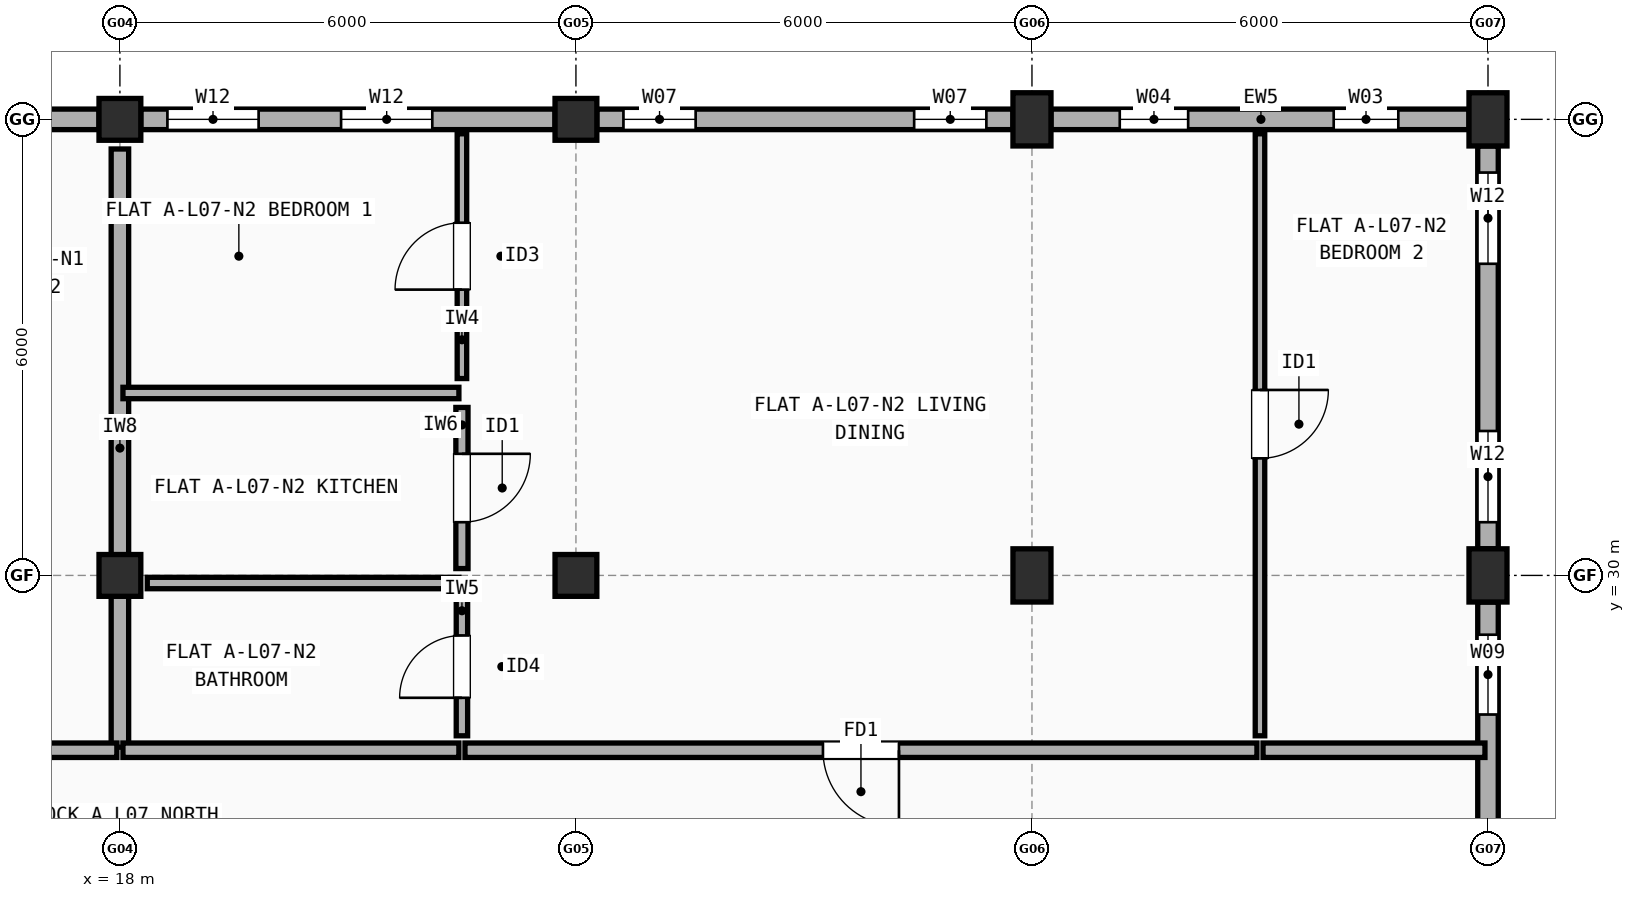
"""IFC4 building model, lengths in metres.
Left out: names, types, materials, properties, quantities, classifications, styles, units other than length and angle.
Written with IfcOpenShell. Run it as: python <this file> out.ifc"""

import sys

from ifc_helpers import new_model, si_unit, direction, frame, frame_2d, origin, origin_2d, place, context, subcontext, project, spatial, rectangle, extrude, element, fill, save


model = new_model("IFC4")
c1 = context("Model", 3, precision=1e-05, world=origin(), true_north=direction((0.0, 1.0)))
c2 = subcontext(c1, "Body", "Model", "MODEL_VIEW")
j1 = project(units=[si_unit("LENGTHUNIT", "METRE"), si_unit("PLANEANGLEUNIT", "RADIAN")], contexts=[c1])
p1 = place(None, origin())
s1 = spatial("IfcSite", under=j1, at=p1, CompositionType="ELEMENT")
p2 = place(p1, origin())
s2 = spatial("IfcBuilding", under=s1, at=p2, CompositionType="ELEMENT")
p3 = place(p2, frame((0.0, 0.0, 23.7)))
s3 = spatial("IfcBuildingStorey", under=s2, at=p3, CompositionType="ELEMENT", Elevation=23.7)
for number, where, z_axis, x_axis in (
    (1, (18.0, 30.0, 0.0), (0.0, 0.0, 1.0), (1.0, 0.0, 0.0)),
    (2, (18.0, 36.0, 0.0), (0.0, 0.0, 1.0), (1.0, 0.0, 0.0)),
    (3, (24.0, 30.0, 0.0), (0.0, 0.0, 1.0), (1.0, 0.0, 0.0)),
    (4, (24.0, 36.0, 0.0), (0.0, 0.0, 1.0), (1.0, 0.0, 0.0)),
):
    element("IfcColumn", number, at=place(p3, frame(where, z_axis=z_axis, x_axis=x_axis)), inside=s3, PredefinedType="COLUMN", context=c2, shape_type="SweptSolid", body=[
        extrude(rectangle(XDim=0.55, YDim=0.55, at=origin_2d()), origin(), (0.0, 0.0, 1.0), 2.975),
    ])
for number, where, z_axis, x_axis in (
    (5, (30.0, 30.0, 0.0), (0.0, 0.0, 1.0), (1.0, 0.0, 0.0)),
    (6, (30.0, 36.0, 0.0), (0.0, 0.0, 1.0), (1.0, 0.0, 0.0)),
    (7, (36.0, 30.0, 0.0), (0.0, 0.0, 1.0), (1.0, 0.0, 0.0)),
    (8, (36.0, 36.0, 0.0), (0.0, 0.0, 1.0), (1.0, 0.0, 0.0)),
):
    element("IfcColumn", number, at=place(p3, frame(where, z_axis=z_axis, x_axis=x_axis)), inside=s3, PredefinedType="COLUMN", context=c2, shape_type="SweptSolid", body=[
        extrude(rectangle(XDim=0.5, YDim=0.7, at=origin_2d()), origin(), (0.0, 0.0, 1.0), 2.975),
    ])
p4 = place(p3, frame((36.0, 24.35, 0.0), z_axis=(0.0, 0.0, 1.0), x_axis=(0.0, 1.0, 0.0)))
e9 = element("IfcWall", 9, at=p4, inside=s3, PredefinedType="STANDARD", context=c2, shape_type="SweptSolid", body=[
    extrude(rectangle(XDim=5.3, YDim=0.27, at=frame_2d((2.65, 0.0))), origin(), (0.0, 0.0, 1.0), 2.457),
])
p5 = place(p4, frame((1.18, 0.0, 0.9)))
e10 = element("IfcOpeningElement", 10, at=p5, cuts=e9, PredefinedType="OPENING", context=c2, shape_type="SweptSolid", body=[
    extrude(rectangle(XDim=0.95, YDim=1.35, at=frame_2d((0.475, 0.675))), frame((0.0, 0.145, 0.0), z_axis=(0.0, -1.0, 0.0), x_axis=(1.0, 0.0, 0.0)), (0.0, 0.0, 1.0), 0.29),
])
p6 = place(p4, frame((3.82, 0.0, 0.9)))
e11 = element("IfcOpeningElement", 11, at=p6, cuts=e9, PredefinedType="OPENING", context=c2, shape_type="SweptSolid", body=[
    extrude(rectangle(XDim=1.05, YDim=1.35, at=frame_2d((0.525, 0.675))), frame((0.0, 0.145, 0.0), z_axis=(0.0, -1.0, 0.0), x_axis=(1.0, 0.0, 0.0)), (0.0, 0.0, 1.0), 0.29),
])
p7 = place(p3, frame((36.0, 30.35, 0.0), z_axis=(0.0, 0.0, 1.0), x_axis=(0.0, 1.0, 0.0)))
e12 = element("IfcWall", 12, at=p7, inside=s3, PredefinedType="STANDARD", context=c2, shape_type="SweptSolid", body=[
    extrude(rectangle(XDim=5.3, YDim=0.27, at=frame_2d((2.65, 0.0))), origin(), (0.0, 0.0, 1.0), 2.457),
])
p8 = place(p7, frame((0.35, 0.0, 0.9)))
e13 = element("IfcOpeningElement", 13, at=p8, cuts=e12, PredefinedType="OPENING", context=c2, shape_type="SweptSolid", body=[
    extrude(rectangle(XDim=1.2, YDim=1.35, at=frame_2d((0.6, 0.675))), frame((0.0, 0.145, 0.0), z_axis=(0.0, -1.0, 0.0), x_axis=(1.0, 0.0, 0.0)), (0.0, 0.0, 1.0), 0.29),
])
p9 = place(p7, frame((3.75, 0.0, 0.9)))
e14 = element("IfcOpeningElement", 14, at=p9, cuts=e12, PredefinedType="OPENING", context=c2, shape_type="SweptSolid", body=[
    extrude(rectangle(XDim=1.2, YDim=1.35, at=frame_2d((0.6, 0.675))), frame((0.0, 0.145, 0.0), z_axis=(0.0, -1.0, 0.0), x_axis=(1.0, 0.0, 0.0)), (0.0, 0.0, 1.0), 0.29),
])
p10 = place(p3, frame((35.75, 36.0, 0.0), z_axis=(0.0, 0.0, 1.0), x_axis=(-1.0, 0.0, 0.0)))
e15 = element("IfcWall", 15, at=p10, inside=s3, PredefinedType="STANDARD", context=c2, shape_type="SweptSolid", body=[
    extrude(rectangle(XDim=5.5, YDim=0.27, at=frame_2d((2.75, 0.0))), origin(), (0.0, 0.0, 1.0), 2.457),
])
p11 = place(p10, frame((0.93, 0.0, 0.9)))
e16 = element("IfcOpeningElement", 16, at=p11, cuts=e15, PredefinedType="OPENING", context=c2, shape_type="SweptSolid", body=[
    extrude(rectangle(XDim=0.85, YDim=1.25, at=frame_2d((0.425, 0.625))), frame((0.0, 0.145, 0.0), z_axis=(0.0, -1.0, 0.0), x_axis=(1.0, 0.0, 0.0)), (0.0, 0.0, 1.0), 0.29),
])
p12 = place(p10, frame((3.695, 0.0, 0.9)))
e17 = element("IfcOpeningElement", 17, at=p12, cuts=e15, PredefinedType="OPENING", context=c2, shape_type="SweptSolid", body=[
    extrude(rectangle(XDim=0.9, YDim=1.3, at=frame_2d((0.45, 0.65))), frame((0.0, 0.145, 0.0), z_axis=(0.0, -1.0, 0.0), x_axis=(1.0, 0.0, 0.0)), (0.0, 0.0, 1.0), 0.29),
])
p13 = place(p3, frame((29.75, 36.0, 0.0), z_axis=(0.0, 0.0, 1.0), x_axis=(-1.0, 0.0, 0.0)))
e18 = element("IfcWall", 18, at=p13, inside=s3, PredefinedType="STANDARD", context=c2, shape_type="SweptSolid", body=[
    extrude(rectangle(XDim=5.475, YDim=0.27, at=frame_2d((2.738, 0.0))), origin(), (0.0, 0.0, 1.0), 2.457),
])
p14 = place(p13, frame((0.35, 0.0, 0.9)))
e19 = element("IfcOpeningElement", 19, at=p14, cuts=e18, PredefinedType="OPENING", context=c2, shape_type="SweptSolid", body=[
    extrude(rectangle(XDim=0.95, YDim=1.35, at=frame_2d((0.475, 0.675))), frame((0.0, 0.145, 0.0), z_axis=(0.0, -1.0, 0.0), x_axis=(1.0, 0.0, 0.0)), (0.0, 0.0, 1.0), 0.29),
])
p15 = place(p13, frame((4.175, 0.0, 0.9)))
e20 = element("IfcOpeningElement", 20, at=p15, cuts=e18, PredefinedType="OPENING", context=c2, shape_type="SweptSolid", body=[
    extrude(rectangle(XDim=0.95, YDim=1.35, at=frame_2d((0.475, 0.675))), frame((0.0, 0.145, 0.0), z_axis=(0.0, -1.0, 0.0), x_axis=(1.0, 0.0, 0.0)), (0.0, 0.0, 1.0), 0.29),
])
p16 = place(p3, frame((23.725, 36.0, 0.0), z_axis=(0.0, 0.0, 1.0), x_axis=(-1.0, 0.0, 0.0)))
e21 = element("IfcWall", 21, at=p16, inside=s3, PredefinedType="STANDARD", context=c2, shape_type="SweptSolid", body=[
    extrude(rectangle(XDim=5.45, YDim=0.27, at=frame_2d((2.725, 0.0))), origin(), (0.0, 0.0, 1.0), 2.457),
])
p17 = place(p16, frame((1.615, 0.0, 0.9)))
e22 = element("IfcOpeningElement", 22, at=p17, cuts=e21, PredefinedType="OPENING", context=c2, shape_type="SweptSolid", body=[
    extrude(rectangle(XDim=1.2, YDim=1.35, at=frame_2d((0.6, 0.675))), frame((0.0, 0.145, 0.0), z_axis=(0.0, -1.0, 0.0), x_axis=(1.0, 0.0, 0.0)), (0.0, 0.0, 1.0), 0.29),
])
p18 = place(p16, frame((3.9, 0.0, 0.9)))
e23 = element("IfcOpeningElement", 23, at=p18, cuts=e21, PredefinedType="OPENING", context=c2, shape_type="SweptSolid", body=[
    extrude(rectangle(XDim=1.2, YDim=1.35, at=frame_2d((0.6, 0.675))), frame((0.0, 0.145, 0.0), z_axis=(0.0, -1.0, 0.0), x_axis=(1.0, 0.0, 0.0)), (0.0, 0.0, 1.0), 0.29),
])
p19 = place(p3, frame((17.725, 36.0, 0.0), z_axis=(0.0, 0.0, 1.0), x_axis=(-1.0, 0.0, 0.0)))
e24 = element("IfcWall", 24, at=p19, inside=s3, PredefinedType="STANDARD", context=c2, shape_type="SweptSolid", body=[
    extrude(rectangle(XDim=5.45, YDim=0.27, at=frame_2d((2.725, 0.0))), origin(), (0.0, 0.0, 1.0), 2.457),
])
p20 = place(p19, frame((0.917, 0.0, 0.9)))
e25 = element("IfcOpeningElement", 25, at=p20, cuts=e24, PredefinedType="OPENING", context=c2, shape_type="SweptSolid", body=[
    extrude(rectangle(XDim=0.85, YDim=1.25, at=frame_2d((0.425, 0.625))), frame((0.0, 0.145, 0.0), z_axis=(0.0, -1.0, 0.0), x_axis=(1.0, 0.0, 0.0)), (0.0, 0.0, 1.0), 0.29),
])
p21 = place(p19, frame((3.657, 0.0, 0.9)))
e26 = element("IfcOpeningElement", 26, at=p21, cuts=e24, PredefinedType="OPENING", context=c2, shape_type="SweptSolid", body=[
    extrude(rectangle(XDim=0.9, YDim=1.3, at=frame_2d((0.45, 0.65))), frame((0.0, 0.145, 0.0), z_axis=(0.0, -1.0, 0.0), x_axis=(1.0, 0.0, 0.0)), (0.0, 0.0, 1.0), 0.29),
])
p22 = place(p3, frame((18.0, 27.74, 0.0), z_axis=(0.0, 0.0, 1.0), x_axis=(0.0, 1.0, 0.0)))
e27 = element("IfcWall", 27, at=p22, inside=s3, PredefinedType="SOLIDWALL", context=c2, shape_type="SweptSolid", body=[
    extrude(rectangle(XDim=7.87, YDim=0.23, at=frame_2d((3.935, 0.0))), origin(), (0.0, 0.0, 1.0), 2.508),
])
p23 = place(p3, frame((15.04, 27.7, 0.0), z_axis=(0.0, 0.0, 1.0), x_axis=(1.0, 0.0, 0.0)))
e28 = element("IfcWall", 28, at=p23, inside=s3, PredefinedType="SOLIDWALL", context=c2, shape_type="SweptSolid", body=[
    extrude(rectangle(XDim=2.92, YDim=0.19, at=frame_2d((1.46, 0.0))), origin(), (0.0, 0.0, 1.0), 2.975),
])
p24 = place(p3, frame((18.04, 27.7, 0.0), z_axis=(0.0, 0.0, 1.0), x_axis=(1.0, 0.0, 0.0)))
e29 = element("IfcWall", 29, at=p24, inside=s3, PredefinedType="SOLIDWALL", context=c2, shape_type="SweptSolid", body=[
    extrude(rectangle(XDim=4.42, YDim=0.19, at=frame_2d((2.21, 0.0))), origin(), (0.0, 0.0, 1.0), 2.975),
])
p25 = place(p3, frame((22.54, 27.7, 0.0), z_axis=(0.0, 0.0, 1.0), x_axis=(1.0, 0.0, 0.0)))
e30 = element("IfcWall", 30, at=p25, inside=s3, PredefinedType="SOLIDWALL", context=c2, shape_type="SweptSolid", body=[
    extrude(rectangle(XDim=10.42, YDim=0.19, at=frame_2d((5.21, 0.0))), origin(), (0.0, 0.0, 1.0), 2.457),
])
p26 = place(p25, frame((4.71, 0.0, 0.0)))
e31 = element("IfcOpeningElement", 31, at=p26, cuts=e30, PredefinedType="OPENING", context=c2, shape_type="SweptSolid", body=[
    extrude(rectangle(XDim=1.0, YDim=2.15, at=frame_2d((0.5, 1.075))), frame((0.0, 0.105, 0.0), z_axis=(0.0, -1.0, 0.0), x_axis=(1.0, 0.0, 0.0)), (0.0, 0.0, 1.0), 0.21),
])
p27 = place(p3, frame((22.5, 32.59, 0.0), z_axis=(0.0, 0.0, 1.0), x_axis=(0.0, 1.0, 0.0)))
e32 = element("IfcWall", 32, at=p27, inside=s3, PredefinedType="PARTITIONING", context=c2, shape_type="SweptSolid", body=[
    extrude(rectangle(XDim=3.22, YDim=0.125, at=frame_2d((1.61, 0.0))), origin(), (0.0, 0.0, 1.0), 2.975),
])
p28 = place(p27, frame((1.17, 0.0, 0.0)))
e33 = element("IfcOpeningElement", 33, at=p28, cuts=e32, PredefinedType="OPENING", context=c2, shape_type="SweptSolid", body=[
    extrude(rectangle(XDim=0.88, YDim=2.1, at=frame_2d((0.44, 1.05))), frame((0.0, 0.073, 0.0), z_axis=(0.0, -1.0, 0.0), x_axis=(1.0, 0.0, 0.0)), (0.0, 0.0, 1.0), 0.145),
])
p29 = place(p3, frame((22.5, 30.09, 0.0), z_axis=(0.0, 0.0, 1.0), x_axis=(0.0, 1.0, 0.0)))
e34 = element("IfcWall", 34, at=p29, inside=s3, PredefinedType="PLUMBINGWALL", context=c2, shape_type="SweptSolid", body=[
    extrude(rectangle(XDim=2.12, YDim=0.16, at=frame_2d((1.06, 0.0))), origin(), (0.0, 0.0, 1.0), 2.457),
])
p30 = place(p29, frame((0.61, 0.0, 0.0)))
e35 = element("IfcOpeningElement", 35, at=p30, cuts=e34, PredefinedType="OPENING", context=c2, shape_type="SweptSolid", body=[
    extrude(rectangle(XDim=0.9, YDim=2.1, at=frame_2d((0.45, 1.05))), frame((0.0, 0.09, 0.0), z_axis=(0.0, -1.0, 0.0), x_axis=(1.0, 0.0, 0.0)), (0.0, 0.0, 1.0), 0.18),
])
p31 = place(p3, frame((22.5, 27.89, 0.0), z_axis=(0.0, 0.0, 1.0), x_axis=(0.0, 1.0, 0.0)))
e36 = element("IfcWall", 36, at=p31, inside=s3, PredefinedType="PARTITIONING", context=c2, shape_type="SweptSolid", body=[
    extrude(rectangle(XDim=1.82, YDim=0.15, at=frame_2d((0.91, 0.0))), origin(), (0.0, 0.0, 1.0), 2.975),
])
p32 = place(p31, frame((0.5, 0.0, 0.0)))
e37 = element("IfcOpeningElement", 37, at=p32, cuts=e36, PredefinedType="OPENING", context=c2, shape_type="SweptSolid", body=[
    extrude(rectangle(XDim=0.82, YDim=2.08, at=frame_2d((0.41, 1.04))), frame((0.0, 0.085, 0.0), z_axis=(0.0, -1.0, 0.0), x_axis=(1.0, 0.0, 0.0)), (0.0, 0.0, 1.0), 0.17),
])
p33 = place(p3, frame((18.04, 32.4, 0.0), z_axis=(0.0, 0.0, 1.0), x_axis=(1.0, 0.0, 0.0)))
e38 = element("IfcWall", 38, at=p33, inside=s3, PredefinedType="PARTITIONING", context=c2, shape_type="SweptSolid", body=[
    extrude(rectangle(XDim=4.42, YDim=0.15, at=frame_2d((2.21, 0.0))), origin(), (0.0, 0.0, 1.0), 2.508),
])
p34 = place(p3, frame((18.36, 29.9, 0.0), z_axis=(0.0, 0.0, 1.0), x_axis=(1.0, 0.0, 0.0)))
e39 = element("IfcWall", 39, at=p34, inside=s3, PredefinedType="PARTITIONING", context=c2, shape_type="SweptSolid", body=[
    extrude(rectangle(XDim=4.1, YDim=0.15, at=frame_2d((2.05, 0.0))), origin(), (0.0, 0.0, 1.0), 2.457),
])
p35 = place(p3, frame((33.04, 27.7, 0.0), z_axis=(0.0, 0.0, 1.0), x_axis=(1.0, 0.0, 0.0)))
e40 = element("IfcWall", 40, at=p35, inside=s3, PredefinedType="SOLIDWALL", context=c2, shape_type="SweptSolid", body=[
    extrude(rectangle(XDim=2.92, YDim=0.19, at=frame_2d((1.46, 0.0))), origin(), (0.0, 0.0, 1.0), 2.457),
])
p36 = place(p3, frame((33.0, 27.89, 0.0), z_axis=(0.0, 0.0, 1.0), x_axis=(0.0, 1.0, 0.0)))
e41 = element("IfcWall", 41, at=p36, inside=s3, PredefinedType="PARTITIONING", context=c2, shape_type="SweptSolid", body=[
    extrude(rectangle(XDim=7.92, YDim=0.125, at=frame_2d((3.96, 0.0))), origin(), (0.0, 0.0, 1.0), 2.457),
])
p37 = place(p36, frame((3.65, 0.0, 0.0)))
e42 = element("IfcOpeningElement", 42, at=p37, cuts=e41, PredefinedType="OPENING", context=c2, shape_type="SweptSolid", body=[
    extrude(rectangle(XDim=0.9, YDim=2.1, at=frame_2d((0.45, 1.05))), frame((0.0, 0.073, 0.0), z_axis=(0.0, -1.0, 0.0), x_axis=(1.0, 0.0, 0.0)), (0.0, 0.0, 1.0), 0.145),
])
p38 = place(p6, origin())
e43 = element("IfcWindow", 43, at=p38, inside=s3, PartitioningType="SINGLE_PANEL", PredefinedType="WINDOW", context=c2, shape_type="SweptSolid", body=[
    extrude(rectangle(XDim=1.05, YDim=1.35, at=frame_2d((0.525, 0.675))), frame((0.0, 0.03, 0.0), z_axis=(0.0, -1.0, 0.0), x_axis=(1.0, 0.0, 0.0)), (0.0, 0.0, 1.0), 0.06),
])
fill(e11, e43)
p39 = place(p8, origin())
e44 = element("IfcWindow", 44, at=p39, inside=s3, PartitioningType="SINGLE_PANEL", PredefinedType="WINDOW", context=c2, shape_type="SweptSolid", body=[
    extrude(rectangle(XDim=1.2, YDim=1.35, at=frame_2d((0.6, 0.675))), frame((0.0, 0.03, 0.0), z_axis=(0.0, -1.0, 0.0), x_axis=(1.0, 0.0, 0.0)), (0.0, 0.0, 1.0), 0.06),
])
fill(e13, e44)
p40 = place(p9, origin())
e45 = element("IfcWindow", 45, at=p40, inside=s3, PartitioningType="SINGLE_PANEL", PredefinedType="WINDOW", context=c2, shape_type="SweptSolid", body=[
    extrude(rectangle(XDim=1.2, YDim=1.35, at=frame_2d((0.6, 0.675))), frame((0.0, 0.03, 0.0), z_axis=(0.0, -1.0, 0.0), x_axis=(1.0, 0.0, 0.0)), (0.0, 0.0, 1.0), 0.06),
])
fill(e14, e45)
p41 = place(p11, origin())
e46 = element("IfcWindow", 46, at=p41, inside=s3, PartitioningType="SINGLE_PANEL", PredefinedType="WINDOW", context=c2, shape_type="SweptSolid", body=[
    extrude(rectangle(XDim=0.85, YDim=1.25, at=frame_2d((0.425, 0.625))), frame((0.0, 0.03, 0.0), z_axis=(0.0, -1.0, 0.0), x_axis=(1.0, 0.0, 0.0)), (0.0, 0.0, 1.0), 0.06),
])
fill(e16, e46)
p42 = place(p12, origin())
e47 = element("IfcWindow", 47, at=p42, inside=s3, PartitioningType="SINGLE_PANEL", PredefinedType="WINDOW", context=c2, shape_type="SweptSolid", body=[
    extrude(rectangle(XDim=0.9, YDim=1.3, at=frame_2d((0.45, 0.65))), frame((0.0, 0.03, 0.0), z_axis=(0.0, -1.0, 0.0), x_axis=(1.0, 0.0, 0.0)), (0.0, 0.0, 1.0), 0.06),
])
fill(e17, e47)
p43 = place(p14, origin())
e48 = element("IfcWindow", 48, at=p43, inside=s3, PartitioningType="SINGLE_PANEL", PredefinedType="WINDOW", context=c2, shape_type="SweptSolid", body=[
    extrude(rectangle(XDim=0.95, YDim=1.35, at=frame_2d((0.475, 0.675))), frame((0.0, 0.03, 0.0), z_axis=(0.0, -1.0, 0.0), x_axis=(1.0, 0.0, 0.0)), (0.0, 0.0, 1.0), 0.06),
])
fill(e19, e48)
p44 = place(p15, origin())
e49 = element("IfcWindow", 49, at=p44, inside=s3, PartitioningType="SINGLE_PANEL", PredefinedType="WINDOW", context=c2, shape_type="SweptSolid", body=[
    extrude(rectangle(XDim=0.95, YDim=1.35, at=frame_2d((0.475, 0.675))), frame((0.0, 0.03, 0.0), z_axis=(0.0, -1.0, 0.0), x_axis=(1.0, 0.0, 0.0)), (0.0, 0.0, 1.0), 0.06),
])
fill(e20, e49)
p45 = place(p17, origin())
e50 = element("IfcWindow", 50, at=p45, inside=s3, PartitioningType="SINGLE_PANEL", PredefinedType="WINDOW", context=c2, shape_type="SweptSolid", body=[
    extrude(rectangle(XDim=1.2, YDim=1.35, at=frame_2d((0.6, 0.675))), frame((0.0, 0.03, 0.0), z_axis=(0.0, -1.0, 0.0), x_axis=(1.0, 0.0, 0.0)), (0.0, 0.0, 1.0), 0.06),
])
fill(e22, e50)
p46 = place(p18, origin())
e51 = element("IfcWindow", 51, at=p46, inside=s3, PartitioningType="SINGLE_PANEL", PredefinedType="WINDOW", context=c2, shape_type="SweptSolid", body=[
    extrude(rectangle(XDim=1.2, YDim=1.35, at=frame_2d((0.6, 0.675))), frame((0.0, 0.03, 0.0), z_axis=(0.0, -1.0, 0.0), x_axis=(1.0, 0.0, 0.0)), (0.0, 0.0, 1.0), 0.06),
])
fill(e23, e51)
p47 = place(p26, origin())
e52 = element("IfcDoor", 52, at=p47, inside=s3, OperationType="SINGLE_SWING_RIGHT", PredefinedType="DOOR", context=c2, shape_type="SweptSolid", body=[
    extrude(rectangle(XDim=1.0, YDim=2.15, at=frame_2d((0.5, 1.075))), frame((0.0, 0.025, 0.0), z_axis=(0.0, -1.0, 0.0), x_axis=(1.0, 0.0, 0.0)), (0.0, 0.0, 1.0), 0.05),
])
fill(e31, e52)
p48 = place(p28, origin())
e53 = element("IfcDoor", 53, at=p48, inside=s3, OperationType="SINGLE_SWING_LEFT", PredefinedType="DOOR", context=c2, shape_type="SweptSolid", body=[
    extrude(rectangle(XDim=0.88, YDim=2.1, at=frame_2d((0.44, 1.05))), frame((0.0, 0.025, 0.0), z_axis=(0.0, -1.0, 0.0), x_axis=(1.0, 0.0, 0.0)), (0.0, 0.0, 1.0), 0.05),
])
fill(e33, e53)
p49 = place(p30, origin())
e54 = element("IfcDoor", 54, at=p49, inside=s3, OperationType="SINGLE_SWING_RIGHT", PredefinedType="DOOR", context=c2, shape_type="SweptSolid", body=[
    extrude(rectangle(XDim=0.9, YDim=2.1, at=frame_2d((0.45, 1.05))), frame((0.0, 0.025, 0.0), z_axis=(0.0, -1.0, 0.0), x_axis=(1.0, 0.0, 0.0)), (0.0, 0.0, 1.0), 0.05),
])
fill(e35, e54)
p50 = place(p32, origin())
e55 = element("IfcDoor", 55, at=p50, inside=s3, OperationType="SINGLE_SWING_LEFT", PredefinedType="DOOR", context=c2, shape_type="SweptSolid", body=[
    extrude(rectangle(XDim=0.82, YDim=2.08, at=frame_2d((0.41, 1.04))), frame((0.0, 0.025, 0.0), z_axis=(0.0, -1.0, 0.0), x_axis=(1.0, 0.0, 0.0)), (0.0, 0.0, 1.0), 0.05),
])
fill(e37, e55)
p51 = place(p37, origin())
e56 = element("IfcDoor", 56, at=p51, inside=s3, OperationType="SINGLE_SWING_RIGHT", PredefinedType="DOOR", context=c2, shape_type="SweptSolid", body=[
    extrude(rectangle(XDim=0.9, YDim=2.1, at=frame_2d((0.45, 1.05))), frame((0.0, 0.025, 0.0), z_axis=(0.0, -1.0, 0.0), x_axis=(1.0, 0.0, 0.0)), (0.0, 0.0, 1.0), 0.05),
])
fill(e42, e56)
save(model, sys.argv[1])
